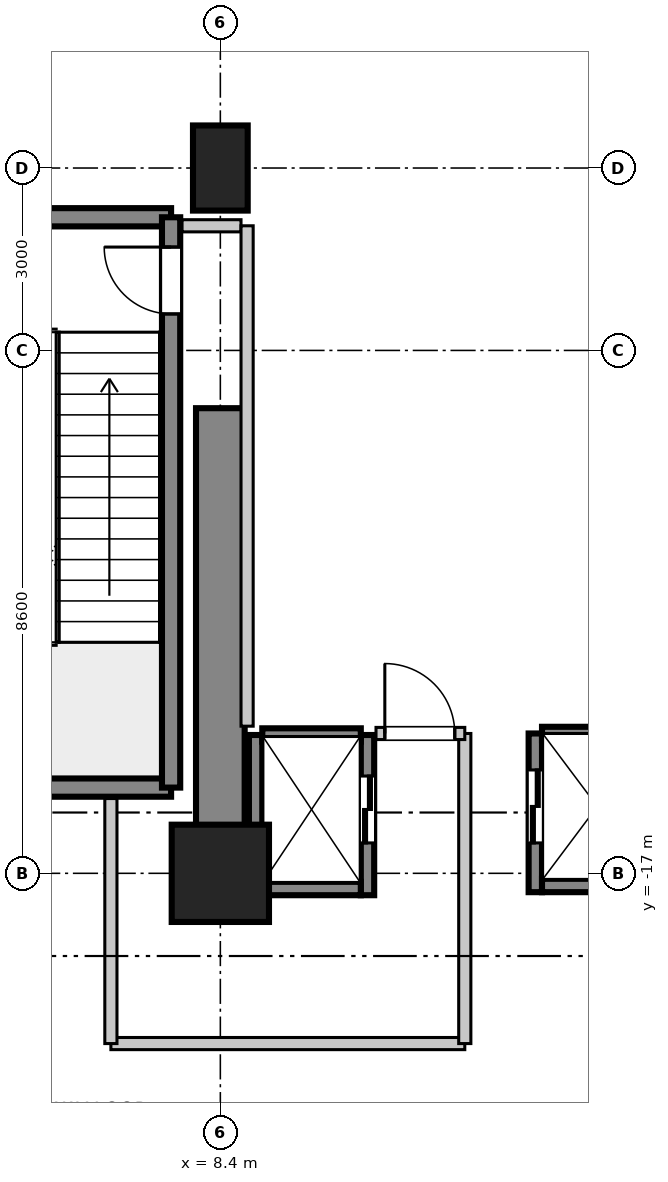
"""IFC4 building model, lengths in metres.
Left out: names, types, materials, properties, quantities, classifications, styles, units other than length and angle.
Written with IfcOpenShell. Run it as: python <this file> out.ifc"""

import sys

from ifc_helpers import new_model, si_unit, direction, frame, frame_2d, origin, origin_2d, place, context, subcontext, project, spatial, rectangle, extrude, source, transform, mapped, element, fill, save


model = new_model("IFC4")
c1 = context("Model", 3, precision=1e-05, world=origin(), true_north=direction((0.0, 1.0)))
c2 = subcontext(c1, "Body", "Model", "MODEL_VIEW")
j1 = project(units=[si_unit("LENGTHUNIT", "METRE"), si_unit("PLANEANGLEUNIT", "RADIAN")], contexts=[c1])
p1 = place(None, origin())
s1 = spatial("IfcSite", under=j1, at=p1, CompositionType="ELEMENT")
p2 = place(p1, origin())
s2 = spatial("IfcBuilding", under=s1, at=p2, CompositionType="ELEMENT")
p3 = place(p2, frame((0.0, 0.0, -5.4)))
s3 = spatial("IfcBuildingStorey", under=s2, at=p3, CompositionType="ELEMENT", Elevation=-5.4)
m1 = source(origin(), c2, "Body", "SweptSolid", [
    extrude(rectangle(XDim=1.6, YDim=1.6, at=origin_2d()), origin(), (0.0, 0.0, 1.0), 5.355),
])
p4 = place(p3, frame((8.4, -17.0, 0.0), z_axis=(0.0, 0.0, 1.0), x_axis=(1.0, 0.0, 0.0)))
e1 = element("IfcColumn", 1, at=p4, inside=s3, PredefinedType="COLUMN", context=c2, shape_type="MappedRepresentation", body=[
    mapped(m1, transform((0.0, 0.0, 0.0), scale=1.0)),
])
m2 = source(origin(), c2, "Body", "SweptSolid", [
    extrude(rectangle(XDim=0.9, YDim=1.4, at=origin_2d()), origin(), (0.0, 0.0, 1.0), 5.355),
])
p5 = place(p3, frame((8.4, -5.4, 0.0), z_axis=(0.0, 0.0, 1.0), x_axis=(1.0, 0.0, 0.0)))
e2 = element("IfcColumn", 2, at=p5, inside=s3, PredefinedType="PILASTER", context=c2, shape_type="MappedRepresentation", body=[
    mapped(m2, transform((0.0, 0.0, 0.0), scale=1.0)),
])
m3 = source(origin(), c2, "Body", "SweptSolid", [
    extrude(rectangle(XDim=7.65, YDim=0.8, at=frame_2d((3.825, 0.0))), origin(), (0.0, 0.0, 1.0), 5.08),
])
p6 = place(p3, frame((8.4, -17.0, 0.0), z_axis=(0.0, 0.0, 1.0), x_axis=(0.0, 1.0, 0.0)))
e3 = element("IfcWall", 3, at=p6, inside=s3, PredefinedType="SHEAR", context=c2, shape_type="MappedRepresentation", body=[
    mapped(m3, transform((0.0, 0.0, 0.0), scale=1.0)),
])
m4 = source(origin(), c2, "Body", "SweptSolid", [
    extrude(rectangle(XDim=3.98, YDim=0.3, at=frame_2d((1.99, 0.0))), origin(), (0.0, 0.0, 1.0), 5.08),
])
for number, where, z_axis, x_axis in (
    (4, (3.61, -15.59, 0.0), (0.0, 0.0, 1.0), (1.0, 0.0, 0.0)),
    (5, (3.61, -6.21, 0.0), (0.0, 0.0, 1.0), (1.0, 0.0, 0.0)),
):
    element("IfcWall", number, at=place(p3, frame(where, z_axis=z_axis, x_axis=x_axis)), inside=s3, PredefinedType="SHEAR", context=c2, shape_type="MappedRepresentation", body=[
        mapped(m4, transform((0.0, 0.0, 0.0), scale=1.0)),
    ])
m5 = source(origin(), c2, "Body", "SweptSolid", [
    extrude(rectangle(XDim=9.38, YDim=0.3, at=frame_2d((4.69, 0.0))), origin(), (0.0, 0.0, 1.0), 5.08),
])
p7 = place(p3, frame((7.59, -15.59, 0.0), z_axis=(0.0, 0.0, 1.0), x_axis=(0.0, 1.0, 0.0)))
e6 = element("IfcWall", 6, at=p7, inside=s3, PredefinedType="SHEAR", context=c2, shape_type="MappedRepresentation", body=[
    mapped(m5, transform((0.0, 0.0, 0.0), scale=1.0)),
])
p8 = place(p7, frame((7.79, 0.0, 0.0)))
e7 = element("IfcOpeningElement", 7, at=p8, cuts=e6, PredefinedType="OPENING", context=c2, shape_type="SweptSolid", body=[
    extrude(rectangle(XDim=1.1, YDim=2.15, at=frame_2d((0.55, 1.075))), frame((0.0, 0.16, 0.0), z_axis=(0.0, -1.0, 0.0), x_axis=(1.0, 0.0, 0.0)), (0.0, 0.0, 1.0), 0.32),
])
m6 = source(origin(), c2, "Body", "SweptSolid", [
    extrude(rectangle(XDim=2.635, YDim=0.22, at=frame_2d((1.317, 0.0))), origin(), (0.0, 0.0, 1.0), 5.08),
])
p9 = place(p3, frame((8.98, -17.36, 0.0), z_axis=(0.0, 0.0, 1.0), x_axis=(0.0, 1.0, 0.0)))
e8 = element("IfcWall", 8, at=p9, inside=s3, PredefinedType="SHEAR", context=c2, shape_type="MappedRepresentation", body=[
    mapped(m6, transform((0.0, 0.0, 0.0), scale=1.0)),
])
p10 = place(p3, frame((10.82, -17.36, 0.0), z_axis=(0.0, 0.0, 1.0), x_axis=(0.0, 1.0, 0.0)))
e9 = element("IfcWall", 9, at=p10, inside=s3, PredefinedType="SHEAR", context=c2, shape_type="MappedRepresentation", body=[
    mapped(m6, transform((0.0, 0.0, 0.0), scale=1.0)),
])
p11 = place(p10, frame((0.86, 0.0, 0.0)))
e10 = element("IfcOpeningElement", 10, at=p11, cuts=e9, PredefinedType="OPENING", context=c2, shape_type="SweptSolid", body=[
    extrude(rectangle(XDim=1.1, YDim=2.2, at=frame_2d((0.55, 1.1))), frame((0.0, 0.12, 0.0), z_axis=(0.0, -1.0, 0.0), x_axis=(1.0, 0.0, 0.0)), (0.0, 0.0, 1.0), 0.24),
])
m7 = source(origin(), c2, "Body", "SweptSolid", [
    extrude(rectangle(XDim=1.62, YDim=0.22, at=frame_2d((0.81, 0.0))), origin(), (0.0, 0.0, 1.0), 5.08),
])
p12 = place(p3, frame((9.09, -17.25, 0.0), z_axis=(0.0, 0.0, 1.0), x_axis=(1.0, 0.0, 0.0)))
e11 = element("IfcWall", 11, at=p12, inside=s3, PredefinedType="SHEAR", context=c2, shape_type="MappedRepresentation", body=[
    mapped(m7, transform((0.0, 0.0, 0.0), scale=1.0)),
])
m8 = source(origin(), c2, "Body", "SweptSolid", [
    extrude(rectangle(XDim=1.62, YDim=0.22, at=frame_2d((0.81, 0.0))), origin(), (0.0, 0.0, 1.0), 5.4),
])
p13 = place(p3, frame((9.09, -14.725, 0.0), z_axis=(0.0, 0.0, 1.0), x_axis=(1.0, 0.0, 0.0)))
e12 = element("IfcWall", 12, at=p13, inside=s3, PredefinedType="SHEAR", context=c2, shape_type="MappedRepresentation", body=[
    mapped(m8, transform((0.0, 0.0, 0.0), scale=1.0)),
])
m9 = source(origin(), c2, "Body", "SweptSolid", [
    extrude(rectangle(XDim=2.61, YDim=0.22, at=frame_2d((1.305, 0.0))), origin(), (0.0, 0.0, 1.0), 5.08),
])
p14 = place(p3, frame((13.58, -17.31, 0.0), z_axis=(0.0, 0.0, 1.0), x_axis=(0.0, 1.0, 0.0)))
e13 = element("IfcWall", 13, at=p14, inside=s3, PredefinedType="SHEAR", context=c2, shape_type="MappedRepresentation", body=[
    mapped(m9, transform((0.0, 0.0, 0.0), scale=1.0)),
])
p15 = place(p14, frame((0.81, 0.0, 0.0)))
e14 = element("IfcOpeningElement", 14, at=p15, cuts=e13, PredefinedType="OPENING", context=c2, shape_type="SweptSolid", body=[
    extrude(rectangle(XDim=1.2, YDim=2.2, at=frame_2d((0.6, 1.1))), frame((0.0, 0.12, 0.0), z_axis=(0.0, -1.0, 0.0), x_axis=(1.0, 0.0, 0.0)), (0.0, 0.0, 1.0), 0.24),
])
m10 = source(origin(), c2, "Body", "SweptSolid", [
    extrude(rectangle(XDim=1.82, YDim=0.22, at=frame_2d((0.91, 0.0))), origin(), (0.0, 0.0, 1.0), 5.08),
])
p16 = place(p3, frame((13.69, -17.2, 0.0), z_axis=(0.0, 0.0, 1.0), x_axis=(1.0, 0.0, 0.0)))
e15 = element("IfcWall", 15, at=p16, inside=s3, PredefinedType="SHEAR", context=c2, shape_type="MappedRepresentation", body=[
    mapped(m10, transform((0.0, 0.0, 0.0), scale=1.0)),
])
m11 = source(origin(), c2, "Body", "SweptSolid", [
    extrude(rectangle(XDim=1.82, YDim=0.22, at=frame_2d((0.91, 0.0))), origin(), (0.0, 0.0, 1.0), 5.4),
])
p17 = place(p3, frame((13.69, -14.7, 0.0), z_axis=(0.0, 0.0, 1.0), x_axis=(1.0, 0.0, 0.0)))
e16 = element("IfcWall", 16, at=p17, inside=s3, PredefinedType="SHEAR", context=c2, shape_type="MappedRepresentation", body=[
    mapped(m11, transform((0.0, 0.0, 0.0), scale=1.0)),
])
m12 = source(origin(), c2, "Body", "SweptSolid", [
    extrude(rectangle(XDim=5.82, YDim=0.2, at=frame_2d((2.91, 0.0))), origin(), (0.0, 0.0, 1.0), 3.4),
])
p18 = place(p3, frame((6.6, -19.8, 0.0), z_axis=(0.0, 0.0, 1.0), x_axis=(1.0, 0.0, 0.0)))
e17 = element("IfcWall", 17, at=p18, inside=s3, PredefinedType="PARTITIONING", context=c2, shape_type="MappedRepresentation", body=[
    mapped(m12, transform((0.0, 0.0, 0.0), scale=1.0)),
])
m13 = source(origin(), c2, "Body", "SweptSolid", [
    extrude(rectangle(XDim=4.03, YDim=0.2, at=frame_2d((2.015, 0.0))), origin(), (0.0, 0.0, 1.0), 3.4),
])
p19 = place(p3, frame((6.6, -19.8, 0.0), z_axis=(0.0, 0.0, 1.0), x_axis=(0.0, 1.0, 0.0)))
e18 = element("IfcWall", 18, at=p19, inside=s3, PredefinedType="PARTITIONING", context=c2, shape_type="MappedRepresentation", body=[
    mapped(m13, transform((0.0, 0.0, 0.0), scale=1.0)),
])
m14 = source(origin(), c2, "Body", "SweptSolid", [
    extrude(rectangle(XDim=5.1, YDim=0.2, at=frame_2d((2.55, 0.0))), origin(), (0.0, 0.0, 1.0), 3.4),
])
p20 = place(p3, frame((12.42, -19.8, 0.0), z_axis=(0.0, 0.0, 1.0), x_axis=(0.0, 1.0, 0.0)))
e19 = element("IfcWall", 19, at=p20, inside=s3, PredefinedType="PARTITIONING", context=c2, shape_type="MappedRepresentation", body=[
    mapped(m14, transform((0.0, 0.0, 0.0), scale=1.0)),
])
m15 = source(origin(), c2, "Body", "SweptSolid", [
    extrude(rectangle(XDim=1.46, YDim=0.2, at=frame_2d((0.73, 0.0))), origin(), (0.0, 0.0, 1.0), 3.4),
])
p21 = place(p3, frame((10.96, -14.7, 0.0), z_axis=(0.0, 0.0, 1.0), x_axis=(1.0, 0.0, 0.0)))
e20 = element("IfcWall", 20, at=p21, inside=s3, PredefinedType="PARTITIONING", context=c2, shape_type="MappedRepresentation", body=[
    mapped(m15, transform((0.0, 0.0, 0.0), scale=1.0)),
])
p22 = place(p21, frame((0.145, 0.0, 0.0)))
e21 = element("IfcOpeningElement", 21, at=p22, cuts=e20, PredefinedType="OPENING", context=c2, shape_type="SweptSolid", body=[
    extrude(rectangle(XDim=1.15, YDim=2.15, at=frame_2d((0.575, 1.075))), frame((0.0, 0.11, 0.0), z_axis=(0.0, -1.0, 0.0), x_axis=(1.0, 0.0, 0.0)), (0.0, 0.0, 1.0), 0.22),
])
m16 = source(origin(), c2, "Body", "SweptSolid", [
    extrude(rectangle(XDim=0.97, YDim=0.2, at=frame_2d((0.485, 0.0))), origin(), (0.0, 0.0, 1.0), 3.4),
])
p23 = place(p3, frame((7.77, -6.35, 0.0), z_axis=(0.0, 0.0, 1.0), x_axis=(1.0, 0.0, 0.0)))
e22 = element("IfcWall", 22, at=p23, inside=s3, PredefinedType="PARTITIONING", context=c2, shape_type="MappedRepresentation", body=[
    mapped(m16, transform((0.0, 0.0, 0.0), scale=1.0)),
])
m17 = source(origin(), c2, "Body", "SweptSolid", [
    extrude(rectangle(XDim=8.23, YDim=0.2, at=frame_2d((4.115, 0.0))), origin(), (0.0, 0.0, 1.0), 3.4),
])
p24 = place(p3, frame((8.84, -14.58, 0.0), z_axis=(0.0, 0.0, 1.0), x_axis=(0.0, 1.0, 0.0)))
e23 = element("IfcWall", 23, at=p24, inside=s3, PredefinedType="PARTITIONING", context=c2, shape_type="MappedRepresentation", body=[
    mapped(m17, transform((0.0, 0.0, 0.0), scale=1.0)),
])
m18 = source(origin(), c2, "Body", "SweptSolid", [
    extrude(rectangle(XDim=1.1, YDim=2.15, at=frame_2d((0.55, 1.075))), frame((0.0, 0.025, 0.0), z_axis=(0.0, -1.0, 0.0), x_axis=(1.0, 0.0, 0.0)), (0.0, 0.0, 1.0), 0.05),
])
p25 = place(p8, origin())
e24 = element("IfcDoor", 24, at=p25, inside=s3, OperationType="SINGLE_SWING_RIGHT", PredefinedType="DOOR", context=c2, shape_type="MappedRepresentation", body=[
    mapped(m18, transform((0.0, 0.0, 0.0), scale=1.0)),
])
fill(e7, e24)
m19 = source(origin(), c2, "Body", "SweptSolid", [
    extrude(rectangle(XDim=1.1, YDim=2.2, at=frame_2d((0.55, 1.1))), frame((0.0, 0.025, 0.0), z_axis=(0.0, -1.0, 0.0), x_axis=(1.0, 0.0, 0.0)), (0.0, 0.0, 1.0), 0.05),
])
p26 = place(p11, frame((1.1, 0.0, 0.0), z_axis=(0.0, 0.0, 1.0), x_axis=(-1.0, 0.0, 0.0)))
e25 = element("IfcDoor", 25, at=p26, inside=s3, OperationType="DOUBLE_DOOR_SLIDING", PredefinedType="DOOR", context=c2, shape_type="MappedRepresentation", body=[
    mapped(m19, transform((0.0, 0.0, 0.0), scale=1.0)),
])
fill(e10, e25)
m20 = source(origin(), c2, "Body", "SweptSolid", [
    extrude(rectangle(XDim=1.2, YDim=2.2, at=frame_2d((0.6, 1.1))), frame((0.0, 0.025, 0.0), z_axis=(0.0, -1.0, 0.0), x_axis=(1.0, 0.0, 0.0)), (0.0, 0.0, 1.0), 0.05),
])
p27 = place(p15, origin())
e26 = element("IfcDoor", 26, at=p27, inside=s3, OperationType="DOUBLE_DOOR_SLIDING", PredefinedType="DOOR", context=c2, shape_type="MappedRepresentation", body=[
    mapped(m20, transform((0.0, 0.0, 0.0), scale=1.0)),
])
fill(e14, e26)
m21 = source(origin(), c2, "Body", "SweptSolid", [
    extrude(rectangle(XDim=1.15, YDim=2.15, at=frame_2d((0.575, 1.075))), frame((0.0, 0.025, 0.0), z_axis=(0.0, -1.0, 0.0), x_axis=(1.0, 0.0, 0.0)), (0.0, 0.0, 1.0), 0.05),
])
p28 = place(p22, origin())
e27 = element("IfcDoor", 27, at=p28, inside=s3, OperationType="SINGLE_SWING_LEFT", PredefinedType="DOOR", context=c2, shape_type="MappedRepresentation", body=[
    mapped(m21, transform((0.0, 0.0, 0.0), scale=1.0)),
])
fill(e21, e27)
save(model, sys.argv[1])
